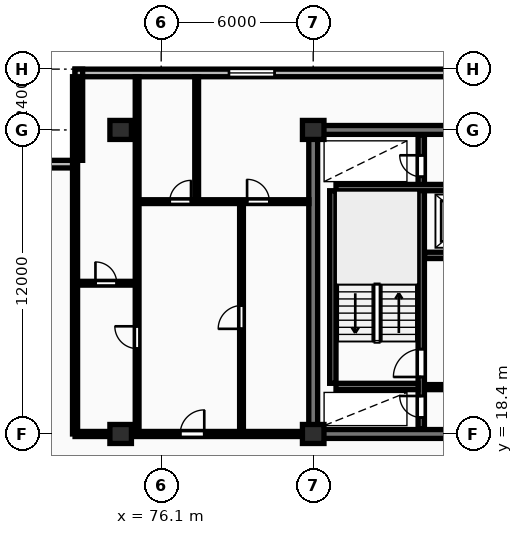
"""IFC4 building model, lengths in metres.
Left out: names, types, materials, properties, quantities, classifications, styles, units other than length and angle.
Written with IfcOpenShell. Run it as: python <this file> out.ifc"""

import sys

from ifc_helpers import new_model, si_unit, direction, frame, frame_2d, origin, origin_2d, place, context, subcontext, project, spatial, rectangle, extrude, element, fill, save


model = new_model("IFC4")
c1 = context("Model", 3, precision=1e-05, world=origin(), true_north=direction((0.0, 1.0)))
c2 = subcontext(c1, "Body", "Model", "MODEL_VIEW")
j1 = project(units=[si_unit("LENGTHUNIT", "METRE"), si_unit("PLANEANGLEUNIT", "RADIAN")], contexts=[c1])
p1 = place(None, origin())
s1 = spatial("IfcSite", under=j1, at=p1, CompositionType="ELEMENT")
p2 = place(p1, origin())
s2 = spatial("IfcBuilding", under=s1, at=p2, CompositionType="ELEMENT")
p3 = place(p2, frame((0.0, 0.0, 93.8)))
s3 = spatial("IfcBuildingStorey", under=s2, at=p3, CompositionType="ELEMENT", Elevation=93.8)
for number, where, z_axis, x_axis in (
    (1, (74.5, 18.4, 0.0), (0.0, 0.0, 1.0), (1.0, 0.0, 0.0)),
    (2, (74.5, 30.4, 0.0), (0.0, 0.0, 1.0), (1.0, 0.0, 0.0)),
    (3, (82.1, 18.4, 0.0), (0.0, 0.0, 1.0), (1.0, 0.0, 0.0)),
    (4, (82.1, 30.4, 0.0), (0.0, 0.0, 1.0), (1.0, 0.0, 0.0)),
):
    element("IfcColumn", number, at=place(p3, frame(where, z_axis=z_axis, x_axis=x_axis)), inside=s3, PredefinedType="COLUMN", context=c2, shape_type="SweptSolid", body=[
        extrude(rectangle(XDim=0.85, YDim=0.75, at=origin_2d()), origin(), (0.0, 0.0, 1.0), 3.25),
    ])
p4 = place(p3, frame((130.7, 32.65, 0.0), z_axis=(0.0, 0.0, 1.0), x_axis=(-1.0, 0.0, 0.0)))
e5 = element("IfcWall", 5, at=p4, inside=s3, PredefinedType="STANDARD", context=c2, shape_type="SweptSolid", body=[
    extrude(rectangle(XDim=58.0, YDim=0.3, at=frame_2d((29.0, 0.0))), origin(), (0.0, 0.0, 1.0), 2.97),
])
p5 = place(p4, frame((50.125, 0.0, 0.85)))
e6 = element("IfcOpeningElement", 6, at=p5, cuts=e5, PredefinedType="OPENING", context=c2, shape_type="SweptSolid", body=[
    extrude(rectangle(XDim=1.8, YDim=1.8, at=frame_2d((0.9, 0.9))), frame((0.0, 0.16, 0.0), z_axis=(0.0, -1.0, 0.0), x_axis=(1.0, 0.0, 0.0)), (0.0, 0.0, 1.0), 0.32),
])
p6 = place(p4, frame((6.775, 0.0, 0.85)))
e7 = element("IfcOpeningElement", 7, at=p6, cuts=e5, PredefinedType="OPENING", context=c2, shape_type="SweptSolid", body=[
    extrude(rectangle(XDim=1.8, YDim=1.8, at=frame_2d((0.9, 0.9))), frame((0.0, 0.16, 0.0), z_axis=(0.0, -1.0, 0.0), x_axis=(1.0, 0.0, 0.0)), (0.0, 0.0, 1.0), 0.32),
])
p7 = place(p3, frame((72.85, 32.8, 0.0), z_axis=(0.0, 0.0, 1.0), x_axis=(0.0, -1.0, 0.0)))
e8 = element("IfcWall", 8, at=p7, inside=s3, PredefinedType="STANDARD", context=c2, shape_type="SweptSolid", body=[
    extrude(rectangle(XDim=3.6, YDim=0.3, at=frame_2d((1.8, 0.0))), origin(), (0.0, 0.0, 1.0), 2.97),
])
p8 = place(p3, frame((72.7, 29.05, 0.0), z_axis=(0.0, 0.0, 1.0), x_axis=(-1.0, 0.0, 0.0)))
e9 = element("IfcWall", 9, at=p8, inside=s3, PredefinedType="STANDARD", context=c2, shape_type="SweptSolid", body=[
    extrude(rectangle(XDim=3.6, YDim=0.3, at=frame_2d((1.8, 0.0))), origin(), (0.0, 0.0, 1.0), 2.97),
])
p9 = place(p3, frame((81.925, 30.4, 0.0), z_axis=(0.0, 0.0, 1.0), x_axis=(1.0, 0.0, 0.0)))
e10 = element("IfcWall", 10, at=p9, inside=s3, PredefinedType="SHEAR", context=c2, shape_type="SweptSolid", body=[
    extrude(rectangle(XDim=36.265, YDim=0.35, at=frame_2d((18.132, 0.0))), origin(), (0.0, 0.0, 1.0), 3.25),
])
p10 = place(p3, frame((82.1, 18.575, 0.0), z_axis=(0.0, 0.0, 1.0), x_axis=(0.0, 1.0, 0.0)))
e11 = element("IfcWall", 11, at=p10, inside=s3, PredefinedType="SHEAR", context=c2, shape_type="SweptSolid", body=[
    extrude(rectangle(XDim=11.65, YDim=0.35, at=frame_2d((5.825, 0.0))), origin(), (0.0, 0.0, 1.0), 3.25),
])
p11 = place(p3, frame((81.925, 18.4, 0.0), z_axis=(0.0, 0.0, 1.0), x_axis=(1.0, 0.0, 0.0)))
e12 = element("IfcWall", 12, at=p11, inside=s3, PredefinedType="SHEAR", context=c2, shape_type="SweptSolid", body=[
    extrude(rectangle(XDim=36.265, YDim=0.35, at=frame_2d((18.132, 0.0))), origin(), (0.0, 0.0, 1.0), 3.25),
])
p12 = place(p11, frame((5.675, 0.0, 0.0)))
e13 = element("IfcOpeningElement", 13, at=p12, cuts=e12, PredefinedType="OPENING", context=c2, shape_type="SweptSolid", body=[
    extrude(rectangle(XDim=1.0, YDim=2.15, at=frame_2d((0.5, 1.075))), frame((0.0, 0.185, 0.0), z_axis=(0.0, -1.0, 0.0), x_axis=(1.0, 0.0, 0.0)), (0.0, 0.0, 1.0), 0.37),
])
p13 = place(p11, frame((21.925, 0.0, 0.0)))
e14 = element("IfcOpeningElement", 14, at=p13, cuts=e12, PredefinedType="OPENING", context=c2, shape_type="SweptSolid", body=[
    extrude(rectangle(XDim=1.5, YDim=2.2, at=frame_2d((0.75, 1.1))), frame((0.0, 0.185, 0.0), z_axis=(0.0, -1.0, 0.0), x_axis=(1.0, 0.0, 0.0)), (0.0, 0.0, 1.0), 0.37),
])
p14 = place(p11, frame((29.875, 0.0, 0.0)))
e15 = element("IfcOpeningElement", 15, at=p14, cuts=e12, PredefinedType="OPENING", context=c2, shape_type="SweptSolid", body=[
    extrude(rectangle(XDim=1.0, YDim=2.15, at=frame_2d((0.5, 1.075))), frame((0.0, 0.185, 0.0), z_axis=(0.0, -1.0, 0.0), x_axis=(1.0, 0.0, 0.0)), (0.0, 0.0, 1.0), 0.37),
])
p15 = place(p3, frame((82.875, 20.4, 0.0), z_axis=(0.0, 0.0, 1.0), x_axis=(0.0, 1.0, 0.0)))
e16 = element("IfcWall", 16, at=p15, inside=s3, PredefinedType="SHEAR", context=c2, shape_type="SweptSolid", body=[
    extrude(rectangle(XDim=7.6, YDim=0.25, at=frame_2d((3.8, 0.0))), origin(), (0.0, 0.0, 1.0), 3.25),
])
p16 = place(p3, frame((86.365, 18.6, 0.0), z_axis=(0.0, 0.0, 1.0), x_axis=(0.0, 1.0, 0.0)))
e17 = element("IfcWall", 17, at=p16, inside=s3, PredefinedType="SHEAR", context=c2, shape_type="SweptSolid", body=[
    extrude(rectangle(XDim=11.6, YDim=0.25, at=frame_2d((5.8, 0.0))), origin(), (0.0, 0.0, 1.0), 3.25),
])
p17 = place(p16, frame((0.45, 0.0, 0.0)))
e18 = element("IfcOpeningElement", 18, at=p17, cuts=e17, PredefinedType="OPENING", context=c2, shape_type="SweptSolid", body=[
    extrude(rectangle(XDim=0.85, YDim=2.05, at=frame_2d((0.425, 1.025))), frame((0.0, 0.135, 0.0), z_axis=(0.0, -1.0, 0.0), x_axis=(1.0, 0.0, 0.0)), (0.0, 0.0, 1.0), 0.27),
])
p18 = place(p16, frame((2.05, 0.0, 0.0)))
e19 = element("IfcOpeningElement", 19, at=p18, cuts=e17, PredefinedType="OPENING", context=c2, shape_type="SweptSolid", body=[
    extrude(rectangle(XDim=1.1, YDim=2.1, at=frame_2d((0.55, 1.05))), frame((0.0, 0.135, 0.0), z_axis=(0.0, -1.0, 0.0), x_axis=(1.0, 0.0, 0.0)), (0.0, 0.0, 1.0), 0.27),
])
p19 = place(p16, frame((9.95, 0.0, 0.0)))
e20 = element("IfcOpeningElement", 20, at=p19, cuts=e17, PredefinedType="OPENING", context=c2, shape_type="SweptSolid", body=[
    extrude(rectangle(XDim=0.85, YDim=2.05, at=frame_2d((0.425, 1.025))), frame((0.0, 0.135, 0.0), z_axis=(0.0, -1.0, 0.0), x_axis=(1.0, 0.0, 0.0)), (0.0, 0.0, 1.0), 0.27),
])
p20 = place(p3, frame((83.0, 20.275, 0.0), z_axis=(0.0, 0.0, 1.0), x_axis=(1.0, 0.0, 0.0)))
e21 = element("IfcWall", 21, at=p20, inside=s3, PredefinedType="SHEAR", context=c2, shape_type="SweptSolid", body=[
    extrude(rectangle(XDim=3.24, YDim=0.25, at=frame_2d((1.62, 0.0))), origin(), (0.0, 0.0, 1.0), 3.25),
])
p21 = place(p3, frame((83.0, 28.125, 0.0), z_axis=(0.0, 0.0, 1.0), x_axis=(1.0, 0.0, 0.0)))
e22 = element("IfcWall", 22, at=p21, inside=s3, PredefinedType="SHEAR", context=c2, shape_type="SweptSolid", body=[
    extrude(rectangle(XDim=7.82, YDim=0.25, at=frame_2d((3.91, 0.0))), origin(), (0.0, 0.0, 1.0), 3.25),
])
p22 = place(p3, frame((86.5, 25.45, 0.0), z_axis=(0.0, 0.0, 1.0), x_axis=(1.0, 0.0, 0.0)))
e23 = element("IfcWall", 23, at=p22, inside=s3, PredefinedType="SHEAR", context=c2, shape_type="SweptSolid", body=[
    extrude(rectangle(XDim=4.32, YDim=0.25, at=frame_2d((2.16, 0.0))), origin(), (0.0, 0.0, 1.0), 3.25),
])
p23 = place(p22, frame((1.14, 0.0, 0.0)))
e24 = element("IfcOpeningElement", 24, at=p23, cuts=e23, PredefinedType="OPENING", context=c2, shape_type="SweptSolid", body=[
    extrude(rectangle(XDim=1.12, YDim=2.12, at=frame_2d((0.56, 1.06))), frame((0.0, 0.135, 0.0), z_axis=(0.0, -1.0, 0.0), x_axis=(1.0, 0.0, 0.0)), (0.0, 0.0, 1.0), 0.27),
])
p24 = place(p22, frame((3.25, 0.0, 0.0)))
e25 = element("IfcOpeningElement", 25, at=p24, cuts=e23, PredefinedType="OPENING", context=c2, shape_type="SweptSolid", body=[
    extrude(rectangle(XDim=0.85, YDim=2.05, at=frame_2d((0.425, 1.025))), frame((0.0, 0.135, 0.0), z_axis=(0.0, -1.0, 0.0), x_axis=(1.0, 0.0, 0.0)), (0.0, 0.0, 1.0), 0.27),
])
p25 = place(p3, frame((86.5, 20.25, 0.0), z_axis=(0.0, 0.0, 1.0), x_axis=(1.0, 0.0, 0.0)))
e26 = element("IfcWall", 26, at=p25, inside=s3, PredefinedType="PARTITIONING", context=c2, shape_type="SweptSolid", body=[
    extrude(rectangle(XDim=4.32, YDim=0.2, at=frame_2d((2.16, 0.0))), origin(), (0.0, 0.0, 1.0), 2.97),
])
p26 = place(p25, frame((1.4, 0.0, 0.0)))
e27 = element("IfcOpeningElement", 27, at=p26, cuts=e26, PredefinedType="OPENING", context=c2, shape_type="SweptSolid", body=[
    extrude(rectangle(XDim=1.1, YDim=2.1, at=frame_2d((0.55, 1.05))), frame((0.0, 0.11, 0.0), z_axis=(0.0, -1.0, 0.0), x_axis=(1.0, 0.0, 0.0)), (0.0, 0.0, 1.0), 0.22),
])
p27 = place(p3, frame((72.7, 18.4, 0.0), z_axis=(0.0, 0.0, 1.0), x_axis=(0.0, 1.0, 0.0)))
e28 = element("IfcWall", 28, at=p27, inside=s3, PredefinedType="PARTITIONING", context=c2, shape_type="SweptSolid", body=[
    extrude(rectangle(XDim=14.1, YDim=0.2, at=frame_2d((7.05, 0.0))), origin(), (0.0, 0.0, 1.0), 2.97),
])
p28 = place(p3, frame((72.7, 24.35, 0.0), z_axis=(0.0, 0.0, 1.0), x_axis=(1.0, 0.0, 0.0)))
e29 = element("IfcWall", 29, at=p28, inside=s3, PredefinedType="PARTITIONING", context=c2, shape_type="SweptSolid", body=[
    extrude(rectangle(XDim=2.45, YDim=0.15, at=frame_2d((1.225, 0.0))), origin(), (0.0, 0.0, 1.0), 2.97),
])
p29 = place(p28, frame((0.805, 0.0, 0.0)))
e30 = element("IfcOpeningElement", 30, at=p29, cuts=e29, PredefinedType="OPENING", context=c2, shape_type="SweptSolid", body=[
    extrude(rectangle(XDim=0.84, YDim=2.04, at=frame_2d((0.42, 1.02))), frame((0.0, 0.085, 0.0), z_axis=(0.0, -1.0, 0.0), x_axis=(1.0, 0.0, 0.0)), (0.0, 0.0, 1.0), 0.17),
])
p30 = place(p3, frame((75.15, 18.45, 0.0), z_axis=(0.0, 0.0, 1.0), x_axis=(0.0, 1.0, 0.0)))
e31 = element("IfcWall", 31, at=p30, inside=s3, PredefinedType="PARTITIONING", context=c2, shape_type="SweptSolid", body=[
    extrude(rectangle(XDim=14.05, YDim=0.15, at=frame_2d((7.025, 0.0))), origin(), (0.0, 0.0, 1.0), 2.97),
])
p31 = place(p30, frame((3.32, 0.0, 0.0)))
e32 = element("IfcOpeningElement", 32, at=p31, cuts=e31, PredefinedType="OPENING", context=c2, shape_type="SweptSolid", body=[
    extrude(rectangle(XDim=0.88, YDim=2.06, at=frame_2d((0.44, 1.03))), frame((0.0, 0.085, 0.0), z_axis=(0.0, -1.0, 0.0), x_axis=(1.0, 0.0, 0.0)), (0.0, 0.0, 1.0), 0.17),
])
p32 = place(p3, frame((79.27, 18.45, 0.0), z_axis=(0.0, 0.0, 1.0), x_axis=(0.0, 1.0, 0.0)))
e33 = element("IfcWall", 33, at=p32, inside=s3, PredefinedType="PARTITIONING", context=c2, shape_type="SweptSolid", body=[
    extrude(rectangle(XDim=9.12, YDim=0.15, at=frame_2d((4.56, 0.0))), origin(), (0.0, 0.0, 1.0), 2.97),
])
p33 = place(p32, frame((4.1, 0.0, 0.0)))
e34 = element("IfcOpeningElement", 34, at=p33, cuts=e33, PredefinedType="OPENING", context=c2, shape_type="SweptSolid", body=[
    extrude(rectangle(XDim=0.92, YDim=2.08, at=frame_2d((0.46, 1.04))), frame((0.0, 0.085, 0.0), z_axis=(0.0, -1.0, 0.0), x_axis=(1.0, 0.0, 0.0)), (0.0, 0.0, 1.0), 0.17),
])
p34 = place(p3, frame((77.5, 27.57, 0.0), z_axis=(0.0, 0.0, 1.0), x_axis=(0.0, 1.0, 0.0)))
e35 = element("IfcWall", 35, at=p34, inside=s3, PredefinedType="PARTITIONING", context=c2, shape_type="SweptSolid", body=[
    extrude(rectangle(XDim=4.93, YDim=0.15, at=frame_2d((2.465, 0.0))), origin(), (0.0, 0.0, 1.0), 2.97),
])
p35 = place(p3, frame((75.17, 27.57, 0.0), z_axis=(0.0, 0.0, 1.0), x_axis=(1.0, 0.0, 0.0)))
e36 = element("IfcWall", 36, at=p35, inside=s3, PredefinedType="PARTITIONING", context=c2, shape_type="SweptSolid", body=[
    extrude(rectangle(XDim=6.76, YDim=0.15, at=frame_2d((3.38, 0.0))), origin(), (0.0, 0.0, 1.0), 2.97),
])
p36 = place(p35, frame((1.266, 0.0, 0.0)))
e37 = element("IfcOpeningElement", 37, at=p36, cuts=e36, PredefinedType="OPENING", context=c2, shape_type="SweptSolid", body=[
    extrude(rectangle(XDim=0.84, YDim=2.04, at=frame_2d((0.42, 1.02))), frame((0.0, 0.085, 0.0), z_axis=(0.0, -1.0, 0.0), x_axis=(1.0, 0.0, 0.0)), (0.0, 0.0, 1.0), 0.17),
])
p37 = place(p35, frame((4.32, 0.0, 0.0)))
e38 = element("IfcOpeningElement", 38, at=p37, cuts=e36, PredefinedType="OPENING", context=c2, shape_type="SweptSolid", body=[
    extrude(rectangle(XDim=0.88, YDim=2.06, at=frame_2d((0.44, 1.03))), frame((0.0, 0.085, 0.0), z_axis=(0.0, -1.0, 0.0), x_axis=(1.0, 0.0, 0.0)), (0.0, 0.0, 1.0), 0.17),
])
p38 = place(p3, frame((72.7, 18.4, 0.0), z_axis=(0.0, 0.0, 1.0), x_axis=(1.0, 0.0, 0.0)))
e39 = element("IfcWall", 39, at=p38, inside=s3, PredefinedType="PARTITIONING", context=c2, shape_type="SweptSolid", body=[
    extrude(rectangle(XDim=9.25, YDim=0.2, at=frame_2d((4.625, 0.0))), origin(), (0.0, 0.0, 1.0), 2.358),
])
p39 = place(p38, frame((4.15, 0.0, 0.0)))
e40 = element("IfcOpeningElement", 40, at=p39, cuts=e39, PredefinedType="OPENING", context=c2, shape_type="SweptSolid", body=[
    extrude(rectangle(XDim=0.95, YDim=2.15, at=frame_2d((0.475, 1.075))), frame((0.0, 0.11, 0.0), z_axis=(0.0, -1.0, 0.0), x_axis=(1.0, 0.0, 0.0)), (0.0, 0.0, 1.0), 0.22),
])
p40 = place(p5, origin())
e41 = element("IfcWindow", 41, at=p40, inside=s3, PartitioningType="SINGLE_PANEL", PredefinedType="WINDOW", context=c2, shape_type="SweptSolid", body=[
    extrude(rectangle(XDim=1.8, YDim=1.8, at=frame_2d((0.9, 0.9))), frame((0.0, 0.03, 0.0), z_axis=(0.0, -1.0, 0.0), x_axis=(1.0, 0.0, 0.0)), (0.0, 0.0, 1.0), 0.06),
])
fill(e6, e41)
p41 = place(p17, origin())
e42 = element("IfcDoor", 42, at=p41, inside=s3, OperationType="SINGLE_SWING_RIGHT", PredefinedType="DOOR", context=c2, shape_type="SweptSolid", body=[
    extrude(rectangle(XDim=0.85, YDim=2.05, at=frame_2d((0.425, 1.025))), frame((0.0, 0.025, 0.0), z_axis=(0.0, -1.0, 0.0), x_axis=(1.0, 0.0, 0.0)), (0.0, 0.0, 1.0), 0.05),
])
fill(e18, e42)
p42 = place(p18, origin())
e43 = element("IfcDoor", 43, at=p42, inside=s3, OperationType="SINGLE_SWING_LEFT", PredefinedType="DOOR", context=c2, shape_type="SweptSolid", body=[
    extrude(rectangle(XDim=1.1, YDim=2.1, at=frame_2d((0.55, 1.05))), frame((0.0, 0.025, 0.0), z_axis=(0.0, -1.0, 0.0), x_axis=(1.0, 0.0, 0.0)), (0.0, 0.0, 1.0), 0.05),
])
fill(e19, e43)
p43 = place(p19, origin())
e44 = element("IfcDoor", 44, at=p43, inside=s3, OperationType="SINGLE_SWING_RIGHT", PredefinedType="DOOR", context=c2, shape_type="SweptSolid", body=[
    extrude(rectangle(XDim=0.85, YDim=2.05, at=frame_2d((0.425, 1.025))), frame((0.0, 0.025, 0.0), z_axis=(0.0, -1.0, 0.0), x_axis=(1.0, 0.0, 0.0)), (0.0, 0.0, 1.0), 0.05),
])
fill(e20, e44)
p44 = place(p29, origin())
e45 = element("IfcDoor", 45, at=p44, inside=s3, OperationType="SINGLE_SWING_LEFT", PredefinedType="DOOR", context=c2, shape_type="SweptSolid", body=[
    extrude(rectangle(XDim=0.84, YDim=2.04, at=frame_2d((0.42, 1.02))), frame((0.0, 0.025, 0.0), z_axis=(0.0, -1.0, 0.0), x_axis=(1.0, 0.0, 0.0)), (0.0, 0.0, 1.0), 0.05),
])
fill(e30, e45)
p45 = place(p31, origin())
e46 = element("IfcDoor", 46, at=p45, inside=s3, OperationType="SINGLE_SWING_RIGHT", PredefinedType="DOOR", context=c2, shape_type="SweptSolid", body=[
    extrude(rectangle(XDim=0.88, YDim=2.06, at=frame_2d((0.44, 1.03))), frame((0.0, 0.025, 0.0), z_axis=(0.0, -1.0, 0.0), x_axis=(1.0, 0.0, 0.0)), (0.0, 0.0, 1.0), 0.05),
])
fill(e32, e46)
p46 = place(p33, origin())
e47 = element("IfcDoor", 47, at=p46, inside=s3, OperationType="SINGLE_SWING_LEFT", PredefinedType="DOOR", context=c2, shape_type="SweptSolid", body=[
    extrude(rectangle(XDim=0.92, YDim=2.08, at=frame_2d((0.46, 1.04))), frame((0.0, 0.025, 0.0), z_axis=(0.0, -1.0, 0.0), x_axis=(1.0, 0.0, 0.0)), (0.0, 0.0, 1.0), 0.05),
])
fill(e34, e47)
p47 = place(p36, origin())
e48 = element("IfcDoor", 48, at=p47, inside=s3, OperationType="SINGLE_SWING_RIGHT", PredefinedType="DOOR", context=c2, shape_type="SweptSolid", body=[
    extrude(rectangle(XDim=0.84, YDim=2.04, at=frame_2d((0.42, 1.02))), frame((0.0, 0.025, 0.0), z_axis=(0.0, -1.0, 0.0), x_axis=(1.0, 0.0, 0.0)), (0.0, 0.0, 1.0), 0.05),
])
fill(e37, e48)
p48 = place(p37, origin())
e49 = element("IfcDoor", 49, at=p48, inside=s3, OperationType="SINGLE_SWING_LEFT", PredefinedType="DOOR", context=c2, shape_type="SweptSolid", body=[
    extrude(rectangle(XDim=0.88, YDim=2.06, at=frame_2d((0.44, 1.03))), frame((0.0, 0.025, 0.0), z_axis=(0.0, -1.0, 0.0), x_axis=(1.0, 0.0, 0.0)), (0.0, 0.0, 1.0), 0.05),
])
fill(e38, e49)
p49 = place(p39, origin())
e50 = element("IfcDoor", 50, at=p49, inside=s3, OperationType="SINGLE_SWING_RIGHT", PredefinedType="DOOR", context=c2, shape_type="SweptSolid", body=[
    extrude(rectangle(XDim=0.95, YDim=2.15, at=frame_2d((0.475, 1.075))), frame((0.0, 0.025, 0.0), z_axis=(0.0, -1.0, 0.0), x_axis=(1.0, 0.0, 0.0)), (0.0, 0.0, 1.0), 0.05),
])
fill(e40, e50)
save(model, sys.argv[1])
